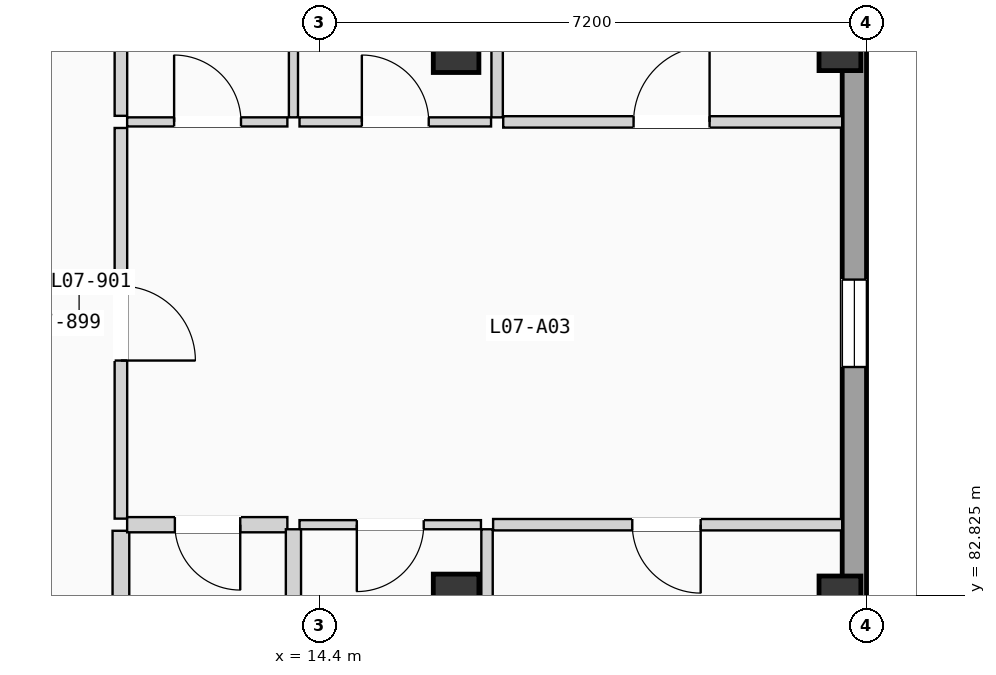
"""IFC4 building model, lengths in metres.
Left out: names, types, materials, properties, quantities, classifications, styles, units other than length and angle.
Written with IfcOpenShell. Run it as: python <this file> out.ifc"""

import sys

from ifc_helpers import new_model, si_unit, direction, frame, frame_2d, origin, origin_2d, place, context, subcontext, project, spatial, rectangle, extrude, element, fill, save


model = new_model("IFC4")
c1 = context("Model", 3, precision=1e-05, world=origin(), true_north=direction((0.0, 1.0)))
c2 = subcontext(c1, "Body", "Model", "MODEL_VIEW")
j1 = project(units=[si_unit("LENGTHUNIT", "METRE"), si_unit("PLANEANGLEUNIT", "RADIAN")], contexts=[c1])
p1 = place(None, origin())
s1 = spatial("IfcSite", under=j1, at=p1, CompositionType="ELEMENT")
p2 = place(p1, origin())
s2 = spatial("IfcBuilding", under=s1, at=p2, CompositionType="ELEMENT")
p3 = place(p2, frame((0.0, 0.0, 24.675)))
s3 = spatial("IfcBuildingStorey", under=s2, at=p3, CompositionType="ELEMENT", Elevation=24.675)
for number, where, z_axis, x_axis in (
    (1, (16.2, 82.8, 0.0), (0.0, 0.0, 1.0), (1.0, 0.0, 0.0)),
    (2, (16.2, 90.0, 0.0), (0.0, 0.0, 1.0), (1.0, 0.0, 0.0)),
):
    element("IfcColumn", number, at=place(p3, frame(where, z_axis=z_axis, x_axis=x_axis)), inside=s3, PredefinedType="COLUMN", context=c2, shape_type="SweptSolid", body=[
        extrude(rectangle(XDim=0.6, YDim=0.6, at=origin_2d()), origin(), (0.0, 0.0, 1.0), 3.15),
    ])
for number, where, z_axis, x_axis in (
    (3, (21.25, 82.8, 0.0), (0.0, 0.0, 1.0), (1.0, 0.0, 0.0)),
    (4, (21.25, 90.0, 0.0), (0.0, 0.0, 1.0), (1.0, 0.0, 0.0)),
):
    element("IfcColumn", number, at=place(p3, frame(where, z_axis=z_axis, x_axis=x_axis)), inside=s3, PredefinedType="COLUMN", context=c2, shape_type="SweptSolid", body=[
        extrude(rectangle(XDim=0.55, YDim=0.55, at=origin_2d()), origin(), (0.0, 0.0, 1.0), 3.15),
    ])
p4 = place(p3, frame((21.44, 68.72, 0.0), z_axis=(0.0, 0.0, 1.0), x_axis=(0.0, 1.0, 0.0)))
e5 = element("IfcWall", 5, at=p4, inside=s3, PredefinedType="SOLIDWALL", context=c2, shape_type="SweptSolid", body=[
    extrude(rectangle(XDim=49.76, YDim=0.32, at=frame_2d((24.88, 0.0))), origin(), (0.0, 0.0, 1.0), 2.9),
])
p5 = place(p4, frame((17.105, 0.0, 0.565)))
e6 = element("IfcOpeningElement", 6, at=p5, cuts=e5, PredefinedType="OPENING", context=c2, shape_type="SweptSolid", body=[
    extrude(rectangle(XDim=1.15, YDim=1.65, at=frame_2d((0.575, 0.825))), frame((0.0, 0.17, 0.0), z_axis=(0.0, -1.0, 0.0), x_axis=(1.0, 0.0, 0.0)), (0.0, 0.0, 1.0), 0.34),
])
p6 = place(p4, frame((10.07, 0.0, 0.85)))
e7 = element("IfcOpeningElement", 7, at=p6, cuts=e5, PredefinedType="OPENING", context=c2, shape_type="SweptSolid", body=[
    extrude(rectangle(XDim=0.95, YDim=1.2, at=frame_2d((0.475, 0.6))), frame((0.0, 0.17, 0.0), z_axis=(0.0, -1.0, 0.0), x_axis=(1.0, 0.0, 0.0)), (0.0, 0.0, 1.0), 0.34),
])
p7 = place(p4, frame((24.255, 0.0, 0.9)))
e8 = element("IfcOpeningElement", 8, at=p7, cuts=e5, PredefinedType="OPENING", context=c2, shape_type="SweptSolid", body=[
    extrude(rectangle(XDim=1.25, YDim=1.2, at=frame_2d((0.625, 0.6))), frame((0.0, 0.17, 0.0), z_axis=(0.0, -1.0, 0.0), x_axis=(1.0, 0.0, 0.0)), (0.0, 0.0, 1.0), 0.34),
])
p8 = place(p4, frame((33.534, 0.0, 0.865)))
e9 = element("IfcOpeningElement", 9, at=p8, cuts=e5, PredefinedType="OPENING", context=c2, shape_type="SweptSolid", body=[
    extrude(rectangle(XDim=1.25, YDim=1.35, at=frame_2d((0.625, 0.675))), frame((0.0, 0.17, 0.0), z_axis=(0.0, -1.0, 0.0), x_axis=(1.0, 0.0, 0.0)), (0.0, 0.0, 1.0), 0.34),
])
p9 = place(p4, frame((30.124, 0.0, 0.715)))
e10 = element("IfcOpeningElement", 10, at=p9, cuts=e5, PredefinedType="OPENING", context=c2, shape_type="SweptSolid", body=[
    extrude(rectangle(XDim=1.25, YDim=1.5, at=frame_2d((0.625, 0.75))), frame((0.0, 0.17, 0.0), z_axis=(0.0, -1.0, 0.0), x_axis=(1.0, 0.0, 0.0)), (0.0, 0.0, 1.0), 0.34),
])
p10 = place(p4, frame((39.727, 0.0, 0.565)))
e11 = element("IfcOpeningElement", 11, at=p10, cuts=e5, PredefinedType="OPENING", context=c2, shape_type="SweptSolid", body=[
    extrude(rectangle(XDim=1.25, YDim=1.65, at=frame_2d((0.625, 0.825))), frame((0.0, 0.17, 0.0), z_axis=(0.0, -1.0, 0.0), x_axis=(1.0, 0.0, 0.0)), (0.0, 0.0, 1.0), 0.34),
])
p11 = place(p3, frame((11.79, 83.83, 0.0), z_axis=(0.0, 0.0, 1.0), x_axis=(0.0, 1.0, 0.0)))
e12 = element("IfcWall", 12, at=p11, inside=s3, PredefinedType="PARTITIONING", context=c2, shape_type="SweptSolid", body=[
    extrude(rectangle(XDim=5.14, YDim=0.165, at=frame_2d((2.57, 0.0))), origin(), (0.0, 0.0, 1.0), 2.87),
])
p12 = place(p11, frame((2.08, 0.0, 0.0)))
e13 = element("IfcOpeningElement", 13, at=p12, cuts=e12, PredefinedType="OPENING", context=c2, shape_type="SweptSolid", body=[
    extrude(rectangle(XDim=0.98, YDim=2.08, at=frame_2d((0.49, 1.04))), frame((0.0, 0.093, 0.0), z_axis=(0.0, -1.0, 0.0), x_axis=(1.0, 0.0, 0.0)), (0.0, 0.0, 1.0), 0.185),
])
p13 = place(p3, frame((11.79, 75.975, 0.0), z_axis=(0.0, 0.0, 1.0), x_axis=(0.0, 1.0, 0.0)))
e14 = element("IfcWall", 14, at=p13, inside=s3, PredefinedType="PLUMBINGWALL", context=c2, shape_type="SweptSolid", body=[
    extrude(rectangle(XDim=7.695, YDim=0.22, at=frame_2d((3.847, 0.0))), origin(), (0.0, 0.0, 1.0), 2.87),
])
p14 = place(p3, frame((11.79, 89.13, 0.0), z_axis=(0.0, 0.0, 1.0), x_axis=(0.0, 1.0, 0.0)))
e15 = element("IfcWall", 15, at=p14, inside=s3, PredefinedType="PARTITIONING", context=c2, shape_type="SweptSolid", body=[
    extrude(rectangle(XDim=7.9, YDim=0.165, at=frame_2d((3.95, 0.0))), origin(), (0.0, 0.0, 1.0), 2.87),
])
p15 = place(p3, frame((11.872, 83.75, 0.0), z_axis=(0.0, 0.0, 1.0), x_axis=(1.0, 0.0, 0.0)))
e16 = element("IfcWall", 16, at=p15, inside=s3, PredefinedType="PLUMBINGWALL", context=c2, shape_type="SweptSolid", body=[
    extrude(rectangle(XDim=2.108, YDim=0.2, at=frame_2d((1.054, 0.0))), origin(), (0.0, 0.0, 1.0), 2.87),
])
p16 = place(p15, frame((0.628, 0.0, 0.0)))
e17 = element("IfcOpeningElement", 17, at=p16, cuts=e16, PredefinedType="OPENING", context=c2, shape_type="SweptSolid", body=[
    extrude(rectangle(XDim=0.86, YDim=2.0, at=frame_2d((0.43, 1.0))), frame((0.0, 0.11, 0.0), z_axis=(0.0, -1.0, 0.0), x_axis=(1.0, 0.0, 0.0)), (0.0, 0.0, 1.0), 0.22),
])
p17 = place(p3, frame((11.872, 89.05, 0.0), z_axis=(0.0, 0.0, 1.0), x_axis=(1.0, 0.0, 0.0)))
e18 = element("IfcWall", 18, at=p17, inside=s3, PredefinedType="PARTITIONING", context=c2, shape_type="SweptSolid", body=[
    extrude(rectangle(XDim=2.108, YDim=0.12, at=frame_2d((1.054, 0.0))), origin(), (0.0, 0.0, 1.0), 2.87),
])
p18 = place(p17, frame((0.618, 0.0, 0.0)))
e19 = element("IfcOpeningElement", 19, at=p18, cuts=e18, PredefinedType="OPENING", context=c2, shape_type="SweptSolid", body=[
    extrude(rectangle(XDim=0.88, YDim=2.02, at=frame_2d((0.44, 1.01))), frame((0.0, 0.07, 0.0), z_axis=(0.0, -1.0, 0.0), x_axis=(1.0, 0.0, 0.0)), (0.0, 0.0, 1.0), 0.14),
])
p19 = place(p3, frame((16.687, 83.75, 0.0), z_axis=(0.0, 0.0, 1.0), x_axis=(1.0, 0.0, 0.0)))
e20 = element("IfcWall", 20, at=p19, inside=s3, PredefinedType="PARTITIONING", context=c2, shape_type="SweptSolid", body=[
    extrude(rectangle(XDim=4.593, YDim=0.15, at=frame_2d((2.296, 0.0))), origin(), (0.0, 0.0, 1.0), 2.87),
])
p20 = place(p19, frame((1.831, 0.0, 0.0)))
e21 = element("IfcOpeningElement", 21, at=p20, cuts=e20, PredefinedType="OPENING", context=c2, shape_type="SweptSolid", body=[
    extrude(rectangle(XDim=0.9, YDim=2.04, at=frame_2d((0.45, 1.02))), frame((0.0, 0.085, 0.0), z_axis=(0.0, -1.0, 0.0), x_axis=(1.0, 0.0, 0.0)), (0.0, 0.0, 1.0), 0.17),
])
p21 = place(p3, frame((14.14, 83.75, 0.0), z_axis=(0.0, 0.0, 1.0), x_axis=(1.0, 0.0, 0.0)))
e22 = element("IfcWall", 22, at=p21, inside=s3, PredefinedType="PARTITIONING", context=c2, shape_type="SweptSolid", body=[
    extrude(rectangle(XDim=2.387, YDim=0.12, at=frame_2d((1.194, 0.0))), origin(), (0.0, 0.0, 1.0), 2.87),
])
p22 = place(p21, frame((0.754, 0.0, 0.0)))
e23 = element("IfcOpeningElement", 23, at=p22, cuts=e22, PredefinedType="OPENING", context=c2, shape_type="SweptSolid", body=[
    extrude(rectangle(XDim=0.88, YDim=2.02, at=frame_2d((0.44, 1.01))), frame((0.0, 0.07, 0.0), z_axis=(0.0, -1.0, 0.0), x_axis=(1.0, 0.0, 0.0)), (0.0, 0.0, 1.0), 0.14),
])
p23 = place(p3, frame((16.82, 89.05, 0.0), z_axis=(0.0, 0.0, 1.0), x_axis=(1.0, 0.0, 0.0)))
e24 = element("IfcWall", 24, at=p23, inside=s3, PredefinedType="PARTITIONING", context=c2, shape_type="SweptSolid", body=[
    extrude(rectangle(XDim=4.46, YDim=0.15, at=frame_2d((2.23, 0.0))), origin(), (0.0, 0.0, 1.0), 2.87),
])
p24 = place(p23, frame((1.715, 0.0, 0.0)))
e25 = element("IfcOpeningElement", 25, at=p24, cuts=e24, PredefinedType="OPENING", context=c2, shape_type="SweptSolid", body=[
    extrude(rectangle(XDim=1.0, YDim=2.06, at=frame_2d((0.5, 1.03))), frame((0.0, 0.085, 0.0), z_axis=(0.0, -1.0, 0.0), x_axis=(1.0, 0.0, 0.0)), (0.0, 0.0, 1.0), 0.17),
])
p25 = place(p3, frame((14.14, 89.05, 0.0), z_axis=(0.0, 0.0, 1.0), x_axis=(1.0, 0.0, 0.0)))
e26 = element("IfcWall", 26, at=p25, inside=s3, PredefinedType="PARTITIONING", context=c2, shape_type="SweptSolid", body=[
    extrude(rectangle(XDim=2.52, YDim=0.12, at=frame_2d((1.26, 0.0))), origin(), (0.0, 0.0, 1.0), 2.87),
])
p26 = place(p25, frame((0.82, 0.0, 0.0)))
e27 = element("IfcOpeningElement", 27, at=p26, cuts=e26, PredefinedType="OPENING", context=c2, shape_type="SweptSolid", body=[
    extrude(rectangle(XDim=0.88, YDim=2.02, at=frame_2d((0.44, 1.01))), frame((0.0, 0.07, 0.0), z_axis=(0.0, -1.0, 0.0), x_axis=(1.0, 0.0, 0.0)), (0.0, 0.0, 1.0), 0.14),
])
p27 = place(p3, frame((14.06, 75.975, 0.0), z_axis=(0.0, 0.0, 1.0), x_axis=(0.0, 1.0, 0.0)))
e28 = element("IfcWall", 28, at=p27, inside=s3, PredefinedType="PLUMBINGWALL", context=c2, shape_type="SweptSolid", body=[
    extrude(rectangle(XDim=7.715, YDim=0.2, at=frame_2d((3.857, 0.0))), origin(), (0.0, 0.0, 1.0), 2.87),
])
p28 = place(p27, frame((3.435, 0.0, 0.0)))
e29 = element("IfcOpeningElement", 29, at=p28, cuts=e28, PredefinedType="OPENING", context=c2, shape_type="SweptSolid", body=[
    extrude(rectangle(XDim=0.85, YDim=2.01, at=frame_2d((0.425, 1.005))), frame((0.0, 0.11, 0.0), z_axis=(0.0, -1.0, 0.0), x_axis=(1.0, 0.0, 0.0)), (0.0, 0.0, 1.0), 0.22),
])
p29 = place(p3, frame((14.06, 89.11, 0.0), z_axis=(0.0, 0.0, 1.0), x_axis=(0.0, 1.0, 0.0)))
e30 = element("IfcWall", 30, at=p29, inside=s3, PredefinedType="PARTITIONING", context=c2, shape_type="SweptSolid", body=[
    extrude(rectangle(XDim=7.92, YDim=0.12, at=frame_2d((3.96, 0.0))), origin(), (0.0, 0.0, 1.0), 2.87),
])
p30 = place(p3, frame((16.607, 76.0, 0.0), z_axis=(0.0, 0.0, 1.0), x_axis=(0.0, 1.0, 0.0)))
e31 = element("IfcWall", 31, at=p30, inside=s3, PredefinedType="PARTITIONING", context=c2, shape_type="SweptSolid", body=[
    extrude(rectangle(XDim=7.69, YDim=0.15, at=frame_2d((3.845, 0.0))), origin(), (0.0, 0.0, 1.0), 2.87),
])
p31 = place(p3, frame((16.74, 89.11, 0.0), z_axis=(0.0, 0.0, 1.0), x_axis=(0.0, 1.0, 0.0)))
e32 = element("IfcWall", 32, at=p31, inside=s3, PredefinedType="PARTITIONING", context=c2, shape_type="SweptSolid", body=[
    extrude(rectangle(XDim=7.92, YDim=0.15, at=frame_2d((3.96, 0.0))), origin(), (0.0, 0.0, 1.0), 2.87),
])
p32 = place(p5, origin())
e33 = element("IfcWindow", 33, at=p32, inside=s3, PartitioningType="SINGLE_PANEL", PredefinedType="WINDOW", context=c2, shape_type="SweptSolid", body=[
    extrude(rectangle(XDim=1.15, YDim=1.65, at=frame_2d((0.575, 0.825))), frame((0.0, 0.03, 0.0), z_axis=(0.0, -1.0, 0.0), x_axis=(1.0, 0.0, 0.0)), (0.0, 0.0, 1.0), 0.06),
])
fill(e6, e33)
p33 = place(p12, frame((0.98, 0.0, 0.0), z_axis=(0.0, 0.0, 1.0), x_axis=(-1.0, 0.0, 0.0)))
e34 = element("IfcDoor", 34, at=p33, inside=s3, OperationType="SINGLE_SWING_LEFT", PredefinedType="DOOR", context=c2, shape_type="SweptSolid", body=[
    extrude(rectangle(XDim=0.98, YDim=2.08, at=frame_2d((0.49, 1.04))), frame((0.0, 0.025, 0.0), z_axis=(0.0, -1.0, 0.0), x_axis=(1.0, 0.0, 0.0)), (0.0, 0.0, 1.0), 0.05),
])
fill(e13, e34)
p34 = place(p16, frame((0.86, 0.0, 0.0), z_axis=(0.0, 0.0, 1.0), x_axis=(-1.0, 0.0, 0.0)))
e35 = element("IfcDoor", 35, at=p34, inside=s3, OperationType="SINGLE_SWING_RIGHT", PredefinedType="DOOR", context=c2, shape_type="SweptSolid", body=[
    extrude(rectangle(XDim=0.86, YDim=2.0, at=frame_2d((0.43, 1.0))), frame((0.0, 0.025, 0.0), z_axis=(0.0, -1.0, 0.0), x_axis=(1.0, 0.0, 0.0)), (0.0, 0.0, 1.0), 0.05),
])
fill(e17, e35)
p35 = place(p18, origin())
e36 = element("IfcDoor", 36, at=p35, inside=s3, OperationType="SINGLE_SWING_LEFT", PredefinedType="DOOR", context=c2, shape_type="SweptSolid", body=[
    extrude(rectangle(XDim=0.88, YDim=2.02, at=frame_2d((0.44, 1.01))), frame((0.0, 0.025, 0.0), z_axis=(0.0, -1.0, 0.0), x_axis=(1.0, 0.0, 0.0)), (0.0, 0.0, 1.0), 0.05),
])
fill(e19, e36)
p36 = place(p20, frame((0.9, 0.0, 0.0), z_axis=(0.0, 0.0, 1.0), x_axis=(-1.0, 0.0, 0.0)))
e37 = element("IfcDoor", 37, at=p36, inside=s3, OperationType="SINGLE_SWING_RIGHT", PredefinedType="DOOR", context=c2, shape_type="SweptSolid", body=[
    extrude(rectangle(XDim=0.9, YDim=2.04, at=frame_2d((0.45, 1.02))), frame((0.0, 0.025, 0.0), z_axis=(0.0, -1.0, 0.0), x_axis=(1.0, 0.0, 0.0)), (0.0, 0.0, 1.0), 0.05),
])
fill(e21, e37)
p37 = place(p22, frame((0.88, 0.0, 0.0), z_axis=(0.0, 0.0, 1.0), x_axis=(-1.0, 0.0, 0.0)))
e38 = element("IfcDoor", 38, at=p37, inside=s3, OperationType="SINGLE_SWING_LEFT", PredefinedType="DOOR", context=c2, shape_type="SweptSolid", body=[
    extrude(rectangle(XDim=0.88, YDim=2.02, at=frame_2d((0.44, 1.01))), frame((0.0, 0.025, 0.0), z_axis=(0.0, -1.0, 0.0), x_axis=(1.0, 0.0, 0.0)), (0.0, 0.0, 1.0), 0.05),
])
fill(e23, e38)
p38 = place(p24, origin())
e39 = element("IfcDoor", 39, at=p38, inside=s3, OperationType="SINGLE_SWING_RIGHT", PredefinedType="DOOR", context=c2, shape_type="SweptSolid", body=[
    extrude(rectangle(XDim=1.0, YDim=2.06, at=frame_2d((0.5, 1.03))), frame((0.0, 0.025, 0.0), z_axis=(0.0, -1.0, 0.0), x_axis=(1.0, 0.0, 0.0)), (0.0, 0.0, 1.0), 0.05),
])
fill(e25, e39)
p39 = place(p26, origin())
e40 = element("IfcDoor", 40, at=p39, inside=s3, OperationType="SINGLE_SWING_LEFT", PredefinedType="DOOR", context=c2, shape_type="SweptSolid", body=[
    extrude(rectangle(XDim=0.88, YDim=2.02, at=frame_2d((0.44, 1.01))), frame((0.0, 0.025, 0.0), z_axis=(0.0, -1.0, 0.0), x_axis=(1.0, 0.0, 0.0)), (0.0, 0.0, 1.0), 0.05),
])
fill(e27, e40)
save(model, sys.argv[1])
